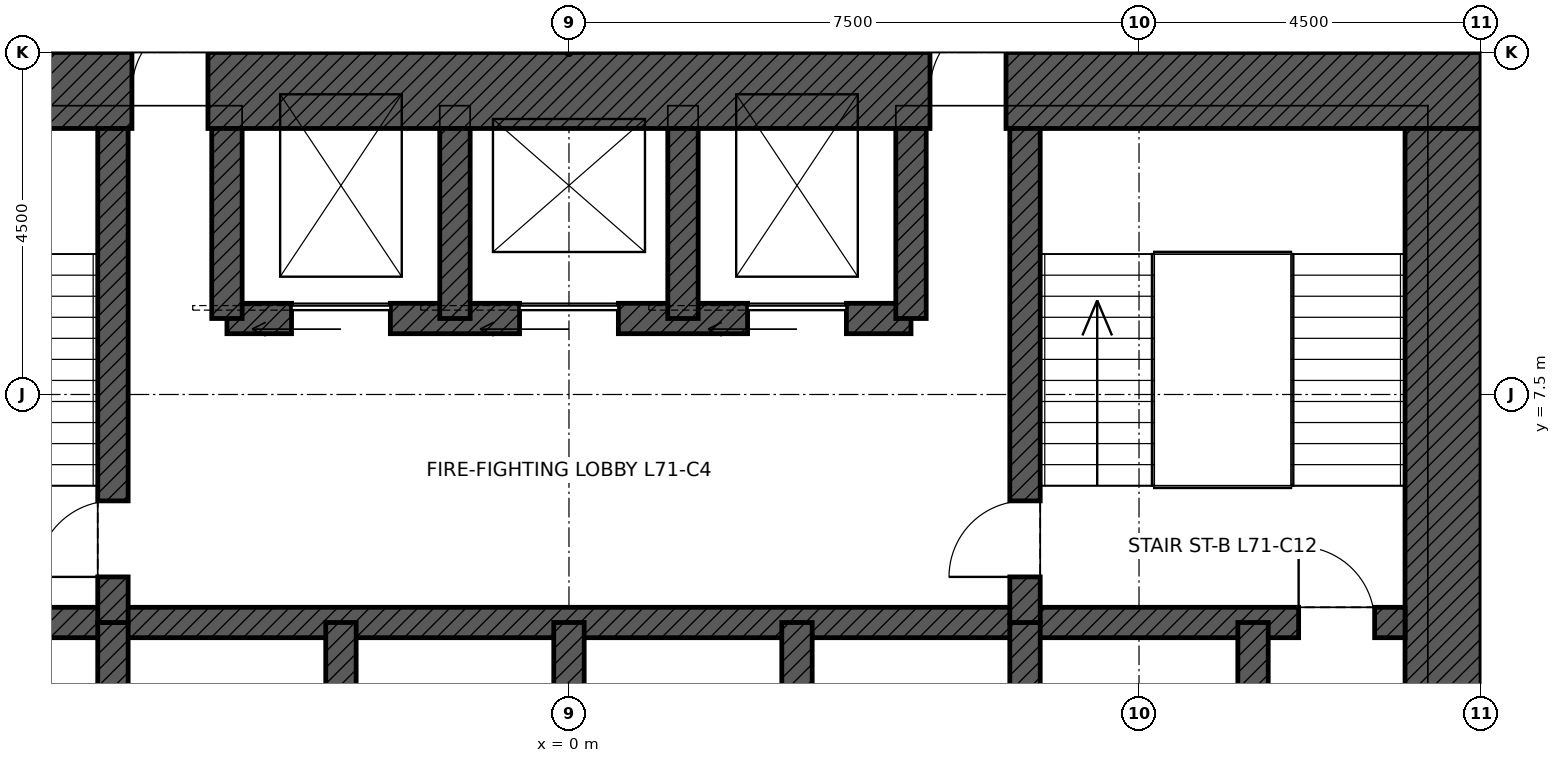
"""IFC4 building model, lengths in metres.
Left out: names, types, materials, properties, quantities, classifications, styles, units other than length and angle.
Written with IfcOpenShell. Run it as: python <this file> out.ifc"""

import sys

from ifc_helpers import new_model, si_unit, direction, frame, frame_2d, origin, place, context, subcontext, project, spatial, rectangle, extrude, element, fill, save


model = new_model("IFC4")
c1 = context("Model", 3, precision=1e-05, world=origin(), true_north=direction((0.0, 1.0)))
c2 = subcontext(c1, "Body", "Model", "MODEL_VIEW")
j1 = project(units=[si_unit("LENGTHUNIT", "METRE"), si_unit("PLANEANGLEUNIT", "RADIAN")], contexts=[c1])
p1 = place(None, origin())
s1 = spatial("IfcSite", under=j1, at=p1, CompositionType="ELEMENT")
p2 = place(p1, origin())
s2 = spatial("IfcBuilding", under=s1, at=p2, CompositionType="ELEMENT")
p3 = place(p2, frame((0.0, 0.0, 319.9)))
s3 = spatial("IfcBuildingStorey", under=s2, at=p3, CompositionType="ELEMENT", Elevation=319.9)
p4 = place(p3, frame((-12.0, 11.5, 0.0), z_axis=(0.0, 0.0, 1.0), x_axis=(1.0, 0.0, 0.0)))
e1 = element("IfcWall", 1, at=p4, inside=s3, PredefinedType="SHEAR", context=c2, shape_type="SweptSolid", body=[
    extrude(rectangle(XDim=24.0, YDim=1.0, at=frame_2d((12.0, 0.0))), origin(), (0.0, 0.0, 1.0), 4.0),
])
p5 = place(p4, frame((6.25, 0.0, 0.0)))
e2 = element("IfcOpeningElement", 2, at=p5, cuts=e1, PredefinedType="OPENING", context=c2, shape_type="SweptSolid", body=[
    extrude(rectangle(XDim=1.0, YDim=2.4, at=frame_2d((0.5, 1.2))), frame((0.0, 0.51, 0.0), z_axis=(0.0, -1.0, 0.0), x_axis=(1.0, 0.0, 0.0)), (0.0, 0.0, 1.0), 1.02),
])
p6 = place(p4, frame((16.75, 0.0, 0.0)))
e3 = element("IfcOpeningElement", 3, at=p6, cuts=e1, PredefinedType="OPENING", context=c2, shape_type="SweptSolid", body=[
    extrude(rectangle(XDim=1.0, YDim=2.4, at=frame_2d((0.5, 1.2))), frame((0.0, 0.51, 0.0), z_axis=(0.0, -1.0, 0.0), x_axis=(1.0, 0.0, 0.0)), (0.0, 0.0, 1.0), 1.02),
])
p7 = place(p3, frame((11.5, 11.0, 0.0), z_axis=(0.0, 0.0, 1.0), x_axis=(0.0, -1.0, 0.0)))
e4 = element("IfcWall", 4, at=p7, inside=s3, PredefinedType="SHEAR", context=c2, shape_type="SweptSolid", body=[
    extrude(rectangle(XDim=22.0, YDim=1.0, at=frame_2d((11.0, 0.0))), origin(), (0.0, 0.0, 1.0), 4.0),
])
p8 = place(p7, frame((10.5, 0.0, 0.0)))
e5 = element("IfcOpeningElement", 5, at=p8, cuts=e4, PredefinedType="OPENING", context=c2, shape_type="SweptSolid", body=[
    extrude(rectangle(XDim=1.0, YDim=2.4, at=frame_2d((0.5, 1.2))), frame((0.0, 0.51, 0.0), z_axis=(0.0, -1.0, 0.0), x_axis=(1.0, 0.0, 0.0)), (0.0, 0.0, 1.0), 1.02),
])
p9 = place(p3, frame((-11.0, 4.5, 0.0), z_axis=(0.0, 0.0, 1.0), x_axis=(1.0, 0.0, 0.0)))
e6 = element("IfcWall", 6, at=p9, inside=s3, PredefinedType="SHEAR", context=c2, shape_type="SweptSolid", body=[
    extrude(rectangle(XDim=22.0, YDim=0.4, at=frame_2d((11.0, 0.0))), origin(), (0.0, 0.0, 1.0), 4.0),
])
p10 = place(p9, frame((0.4, 0.0, 0.0)))
e7 = element("IfcOpeningElement", 7, at=p10, cuts=e6, PredefinedType="OPENING", context=c2, shape_type="SweptSolid", body=[
    extrude(rectangle(XDim=1.0, YDim=2.1, at=frame_2d((0.5, 1.05))), frame((0.0, 0.21, 0.0), z_axis=(0.0, -1.0, 0.0), x_axis=(1.0, 0.0, 0.0)), (0.0, 0.0, 1.0), 0.42),
])
p11 = place(p9, frame((20.6, 0.0, 0.0)))
e8 = element("IfcOpeningElement", 8, at=p11, cuts=e6, PredefinedType="OPENING", context=c2, shape_type="SweptSolid", body=[
    extrude(rectangle(XDim=1.0, YDim=2.1, at=frame_2d((0.5, 1.05))), frame((0.0, 0.21, 0.0), z_axis=(0.0, -1.0, 0.0), x_axis=(1.0, 0.0, 0.0)), (0.0, 0.0, 1.0), 0.42),
])
p12 = place(p3, frame((-4.5, 8.5, 0.0), z_axis=(0.0, 0.0, 1.0), x_axis=(1.0, 0.0, 0.0)))
e9 = element("IfcWall", 9, at=p12, inside=s3, PredefinedType="SHEAR", context=c2, shape_type="SweptSolid", body=[
    extrude(rectangle(XDim=9.0, YDim=0.4, at=frame_2d((4.5, 0.0))), origin(), (0.0, 0.0, 1.0), 4.0),
])
p13 = place(p12, frame((0.85, 0.0, 0.0)))
e10 = element("IfcOpeningElement", 10, at=p13, cuts=e9, PredefinedType="OPENING", context=c2, shape_type="SweptSolid", body=[
    extrude(rectangle(XDim=1.3, YDim=2.4, at=frame_2d((0.65, 1.2))), frame((0.0, 0.21, 0.0), z_axis=(0.0, -1.0, 0.0), x_axis=(1.0, 0.0, 0.0)), (0.0, 0.0, 1.0), 0.42),
])
p14 = place(p12, frame((6.85, 0.0, 0.0)))
e11 = element("IfcOpeningElement", 11, at=p14, cuts=e9, PredefinedType="OPENING", context=c2, shape_type="SweptSolid", body=[
    extrude(rectangle(XDim=1.3, YDim=2.4, at=frame_2d((0.65, 1.2))), frame((0.0, 0.21, 0.0), z_axis=(0.0, -1.0, 0.0), x_axis=(1.0, 0.0, 0.0)), (0.0, 0.0, 1.0), 0.42),
])
p15 = place(p12, frame((3.85, 0.0, 0.0)))
e12 = element("IfcOpeningElement", 12, at=p15, cuts=e9, PredefinedType="OPENING", context=c2, shape_type="SweptSolid", body=[
    extrude(rectangle(XDim=1.3, YDim=2.4, at=frame_2d((0.65, 1.2))), frame((0.0, 0.21, 0.0), z_axis=(0.0, -1.0, 0.0), x_axis=(1.0, 0.0, 0.0)), (0.0, 0.0, 1.0), 0.42),
])
for number, where, z_axis, x_axis in (
    (13, (9.0, 1.5, 0.0), (0.0, 0.0, 1.0), (0.0, 1.0, 0.0)),
    (14, (-6.0, 1.5, 0.0), (0.0, 0.0, 1.0), (0.0, 1.0, 0.0)),
    (15, (-3.0, 1.5, 0.0), (0.0, 0.0, 1.0), (0.0, 1.0, 0.0)),
    (16, (0.0, 1.5, 0.0), (0.0, 0.0, 1.0), (0.0, 1.0, 0.0)),
    (17, (3.0, 1.5, 0.0), (0.0, 0.0, 1.0), (0.0, 1.0, 0.0)),
    (18, (6.0, 1.5, 0.0), (0.0, 0.0, 1.0), (0.0, 1.0, 0.0)),
):
    element("IfcWall", number, at=place(p3, frame(where, z_axis=z_axis, x_axis=x_axis)), inside=s3, PredefinedType="SHEAR", context=c2, shape_type="SweptSolid", body=[
        extrude(rectangle(XDim=3.0, YDim=0.4, at=frame_2d((1.5, 0.0))), origin(), (0.0, 0.0, 1.0), 4.0),
    ])
p16 = place(p3, frame((-6.0, 4.5, 0.0), z_axis=(0.0, 0.0, 1.0), x_axis=(0.0, 1.0, 0.0)))
e19 = element("IfcWall", 19, at=p16, inside=s3, PredefinedType="SHEAR", context=c2, shape_type="SweptSolid", body=[
    extrude(rectangle(XDim=6.5, YDim=0.4, at=frame_2d((3.25, 0.0))), origin(), (0.0, 0.0, 1.0), 4.0),
])
p17 = place(p16, frame((0.6, 0.0, 0.0)))
e20 = element("IfcOpeningElement", 20, at=p17, cuts=e19, PredefinedType="OPENING", context=c2, shape_type="SweptSolid", body=[
    extrude(rectangle(XDim=1.0, YDim=2.1, at=frame_2d((0.5, 1.05))), frame((0.0, 0.21, 0.0), z_axis=(0.0, -1.0, 0.0), x_axis=(1.0, 0.0, 0.0)), (0.0, 0.0, 1.0), 0.42),
])
p18 = place(p3, frame((6.0, 4.5, 0.0), z_axis=(0.0, 0.0, 1.0), x_axis=(0.0, 1.0, 0.0)))
e21 = element("IfcWall", 21, at=p18, inside=s3, PredefinedType="SHEAR", context=c2, shape_type="SweptSolid", body=[
    extrude(rectangle(XDim=6.5, YDim=0.4, at=frame_2d((3.25, 0.0))), origin(), (0.0, 0.0, 1.0), 4.0),
])
p19 = place(p18, frame((0.6, 0.0, 0.0)))
e22 = element("IfcOpeningElement", 22, at=p19, cuts=e21, PredefinedType="OPENING", context=c2, shape_type="SweptSolid", body=[
    extrude(rectangle(XDim=1.0, YDim=2.1, at=frame_2d((0.5, 1.05))), frame((0.0, 0.21, 0.0), z_axis=(0.0, -1.0, 0.0), x_axis=(1.0, 0.0, 0.0)), (0.0, 0.0, 1.0), 0.42),
])
for number, where, z_axis, x_axis in (
    (23, (-4.5, 8.5, 0.0), (0.0, 0.0, 1.0), (0.0, 1.0, 0.0)),
    (24, (4.5, 8.5, 0.0), (0.0, 0.0, 1.0), (0.0, 1.0, 0.0)),
    (25, (-1.5, 8.5, 0.0), (0.0, 0.0, 1.0), (0.0, 1.0, 0.0)),
    (26, (1.5, 8.5, 0.0), (0.0, 0.0, 1.0), (0.0, 1.0, 0.0)),
):
    element("IfcWall", number, at=place(p3, frame(where, z_axis=z_axis, x_axis=x_axis)), inside=s3, PredefinedType="SHEAR", context=c2, shape_type="SweptSolid", body=[
        extrude(rectangle(XDim=2.5, YDim=0.4, at=frame_2d((1.25, 0.0))), origin(), (0.0, 0.0, 1.0), 4.0),
    ])
p20 = place(p11, origin())
e27 = element("IfcDoor", 27, at=p20, inside=s3, OperationType="SINGLE_SWING_LEFT", PredefinedType="DOOR", context=c2, shape_type="SweptSolid", body=[
    extrude(rectangle(XDim=1.0, YDim=2.1, at=frame_2d((0.5, 1.05))), frame((0.0, 0.025, 0.0), z_axis=(0.0, -1.0, 0.0), x_axis=(1.0, 0.0, 0.0)), (0.0, 0.0, 1.0), 0.05),
])
fill(e8, e27)
p21 = place(p17, origin())
e28 = element("IfcDoor", 28, at=p21, inside=s3, OperationType="SINGLE_SWING_LEFT", PredefinedType="DOOR", context=c2, shape_type="SweptSolid", body=[
    extrude(rectangle(XDim=1.0, YDim=2.1, at=frame_2d((0.5, 1.05))), frame((0.0, 0.025, 0.0), z_axis=(0.0, -1.0, 0.0), x_axis=(1.0, 0.0, 0.0)), (0.0, 0.0, 1.0), 0.05),
])
fill(e20, e28)
p22 = place(p19, origin())
e29 = element("IfcDoor", 29, at=p22, inside=s3, OperationType="SINGLE_SWING_LEFT", PredefinedType="DOOR", context=c2, shape_type="SweptSolid", body=[
    extrude(rectangle(XDim=1.0, YDim=2.1, at=frame_2d((0.5, 1.05))), frame((0.0, 0.025, 0.0), z_axis=(0.0, -1.0, 0.0), x_axis=(1.0, 0.0, 0.0)), (0.0, 0.0, 1.0), 0.05),
])
fill(e22, e29)
p23 = place(p5, origin())
e30 = element("IfcDoor", 30, at=p23, inside=s3, OperationType="SINGLE_SWING_RIGHT", PredefinedType="DOOR", context=c2, shape_type="SweptSolid", body=[
    extrude(rectangle(XDim=1.0, YDim=2.4, at=frame_2d((0.5, 1.2))), frame((0.0, 0.485, 0.0), z_axis=(0.0, -1.0, 0.0), x_axis=(1.0, 0.0, 0.0)), (0.0, 0.0, 1.0), 0.05),
])
fill(e2, e30)
p24 = place(p6, origin())
e31 = element("IfcDoor", 31, at=p24, inside=s3, OperationType="SINGLE_SWING_RIGHT", PredefinedType="DOOR", context=c2, shape_type="SweptSolid", body=[
    extrude(rectangle(XDim=1.0, YDim=2.4, at=frame_2d((0.5, 1.2))), frame((0.0, 0.485, 0.0), z_axis=(0.0, -1.0, 0.0), x_axis=(1.0, 0.0, 0.0)), (0.0, 0.0, 1.0), 0.05),
])
fill(e3, e31)
p25 = place(p13, origin())
e32 = element("IfcDoor", 32, at=p25, inside=s3, OperationType="SLIDING_TO_LEFT", PredefinedType="DOOR", context=c2, shape_type="SweptSolid", body=[
    extrude(rectangle(XDim=1.3, YDim=2.4, at=frame_2d((0.65, 1.2))), frame((0.0, 0.025, 0.0), z_axis=(0.0, -1.0, 0.0), x_axis=(1.0, 0.0, 0.0)), (0.0, 0.0, 1.0), 0.05),
])
fill(e10, e32)
p26 = place(p14, origin())
e33 = element("IfcDoor", 33, at=p26, inside=s3, OperationType="SLIDING_TO_LEFT", PredefinedType="DOOR", context=c2, shape_type="SweptSolid", body=[
    extrude(rectangle(XDim=1.3, YDim=2.4, at=frame_2d((0.65, 1.2))), frame((0.0, 0.025, 0.0), z_axis=(0.0, -1.0, 0.0), x_axis=(1.0, 0.0, 0.0)), (0.0, 0.0, 1.0), 0.05),
])
fill(e11, e33)
p27 = place(p15, origin())
e34 = element("IfcDoor", 34, at=p27, inside=s3, OperationType="SLIDING_TO_LEFT", PredefinedType="DOOR", context=c2, shape_type="SweptSolid", body=[
    extrude(rectangle(XDim=1.3, YDim=2.4, at=frame_2d((0.65, 1.2))), frame((0.0, 0.025, 0.0), z_axis=(0.0, -1.0, 0.0), x_axis=(1.0, 0.0, 0.0)), (0.0, 0.0, 1.0), 0.05),
])
fill(e12, e34)
save(model, sys.argv[1])
